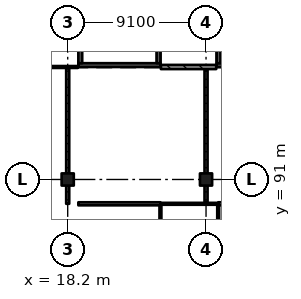
"""IFC4 building model, lengths in metres.
Left out: names, types, materials, properties, quantities, classifications, styles, units other than length and angle.
Written with IfcOpenShell. Run it as: python <this file> out.ifc"""

import sys

from ifc_helpers import new_model, si_unit, direction, frame, frame_2d, origin, origin_2d, place, context, subcontext, project, spatial, rectangle, extrude, element, fill, save


model = new_model("IFC4")
c1 = context("Model", 3, precision=1e-05, world=origin(), true_north=direction((0.0, 1.0)))
c2 = subcontext(c1, "Body", "Model", "MODEL_VIEW")
j1 = project(units=[si_unit("LENGTHUNIT", "METRE"), si_unit("PLANEANGLEUNIT", "RADIAN")], contexts=[c1])
p1 = place(None, origin())
s1 = spatial("IfcSite", under=j1, at=p1, CompositionType="ELEMENT")
p2 = place(p1, origin())
s2 = spatial("IfcBuilding", under=s1, at=p2, CompositionType="ELEMENT")
p3 = place(p2, frame((0.0, 0.0, 10.92)))
s3 = spatial("IfcBuildingStorey", under=s2, at=p3, CompositionType="ELEMENT", Elevation=10.92)
for number, where, z_axis, x_axis in (
    (1, (18.2, 91.0, 0.0), (0.0, 0.0, 1.0), (1.0, 0.0, 0.0)),
    (2, (27.3, 91.0, 0.0), (0.0, 0.0, 1.0), (1.0, 0.0, 0.0)),
):
    element("IfcColumn", number, at=place(p3, frame(where, z_axis=z_axis, x_axis=x_axis)), inside=s3, PredefinedType="COLUMN", context=c2, shape_type="SweptSolid", body=[
        extrude(rectangle(XDim=0.8, YDim=0.8, at=origin_2d()), origin(), (0.0, 0.0, 1.0), 4.55),
    ])
p4 = place(p3, frame((24.3, 98.525, 0.0), z_axis=(0.0, 0.0, 1.0), x_axis=(-1.0, 0.0, 0.0)))
e3 = element("IfcWall", 3, at=p4, inside=s3, PredefinedType="SHEAR", context=c2, shape_type="SweptSolid", body=[
    extrude(rectangle(XDim=5.4, YDim=0.25, at=frame_2d((2.7, 0.0))), origin(), (0.0, 0.0, 1.0), 4.55),
])
p5 = place(p4, frame((1.5, 0.0, 0.0)))
e4 = element("IfcOpeningElement", 4, at=p5, cuts=e3, PredefinedType="OPENING", context=c2, shape_type="SweptSolid", body=[
    extrude(rectangle(XDim=2.4, YDim=2.1, at=frame_2d((1.2, 1.05))), frame((0.0, 0.135, 0.0), z_axis=(0.0, -1.0, 0.0), x_axis=(1.0, 0.0, 0.0)), (0.0, 0.0, 1.0), 0.27),
])
for number, where, z_axis, x_axis in (
    (5, (19.025, 108.25, 0.0), (0.0, 0.0, 1.0), (0.0, -1.0, 0.0)),
    (6, (24.175, 108.25, 0.0), (0.0, 0.0, 1.0), (0.0, -1.0, 0.0)),
):
    element("IfcWall", number, at=place(p3, frame(where, z_axis=z_axis, x_axis=x_axis)), inside=s3, PredefinedType="SHEAR", context=c2, shape_type="SweptSolid", body=[
        extrude(rectangle(XDim=9.6, YDim=0.25, at=frame_2d((4.8, 0.0))), origin(), (0.0, 0.0, 1.0), 4.55),
    ])
p6 = place(p3, frame((33.4, 98.525, 0.0), z_axis=(0.0, 0.0, 1.0), x_axis=(-1.0, 0.0, 0.0)))
e7 = element("IfcWall", 7, at=p6, inside=s3, PredefinedType="SHEAR", context=c2, shape_type="SweptSolid", body=[
    extrude(rectangle(XDim=5.4, YDim=0.25, at=frame_2d((2.7, 0.0))), origin(), (0.0, 0.0, 1.0), 4.55),
])
p7 = place(p6, frame((1.5, 0.0, 0.0)))
e8 = element("IfcOpeningElement", 8, at=p7, cuts=e7, PredefinedType="OPENING", context=c2, shape_type="SweptSolid", body=[
    extrude(rectangle(XDim=2.4, YDim=2.1, at=frame_2d((1.2, 1.05))), frame((0.0, 0.135, 0.0), z_axis=(0.0, -1.0, 0.0), x_axis=(1.0, 0.0, 0.0)), (0.0, 0.0, 1.0), 0.27),
])
p8 = place(p3, frame((28.125, 108.25, 0.0), z_axis=(0.0, 0.0, 1.0), x_axis=(0.0, -1.0, 0.0)))
e9 = element("IfcWall", 9, at=p8, inside=s3, PredefinedType="SHEAR", context=c2, shape_type="SweptSolid", body=[
    extrude(rectangle(XDim=9.6, YDim=0.25, at=frame_2d((4.8, 0.0))), origin(), (0.0, 0.0, 1.0), 4.55),
])
p9 = place(p3, frame((15.23, 98.4, 0.0), z_axis=(0.0, 0.0, 1.0), x_axis=(1.0, 0.0, 0.0)))
e10 = element("IfcWall", 10, at=p9, inside=s3, PredefinedType="PARTITIONING", context=c2, shape_type="SweptSolid", body=[
    extrude(rectangle(XDim=3.64, YDim=0.125, at=frame_2d((1.82, 0.0))), origin(), (0.0, 0.0, 1.0), 4.25),
])
p10 = place(p9, frame((1.05, 0.0, 0.0)))
e11 = element("IfcOpeningElement", 11, at=p10, cuts=e10, PredefinedType="OPENING", context=c2, shape_type="SweptSolid", body=[
    extrude(rectangle(XDim=0.9, YDim=2.1, at=frame_2d((0.45, 1.05))), frame((0.0, 0.073, 0.0), z_axis=(0.0, -1.0, 0.0), x_axis=(1.0, 0.0, 0.0)), (0.0, 0.0, 1.0), 0.145),
])
p11 = place(p3, frame((18.2, 90.6, 0.0), z_axis=(0.0, 0.0, 1.0), x_axis=(0.0, -1.0, 0.0)))
e12 = element("IfcWall", 12, at=p11, inside=s3, PredefinedType="PARTITIONING", context=c2, shape_type="SweptSolid", body=[
    extrude(rectangle(XDim=1.2, YDim=0.2, at=frame_2d((0.6, 0.0))), origin(), (0.0, 0.0, 1.0), 3.55),
])
p12 = place(p3, frame((18.2, 98.337, 0.0), z_axis=(0.0, 0.0, 1.0), x_axis=(0.0, -1.0, 0.0)))
e13 = element("IfcWall", 13, at=p12, inside=s3, PredefinedType="PARTITIONING", context=c2, shape_type="SweptSolid", body=[
    extrude(rectangle(XDim=6.938, YDim=0.2, at=frame_2d((3.469, 0.0))), origin(), (0.0, 0.0, 1.0), 3.55),
])
p13 = place(p12, frame((0.85, 0.0, 0.0)))
e14 = element("IfcOpeningElement", 14, at=p13, cuts=e13, PredefinedType="OPENING", context=c2, shape_type="SweptSolid", body=[
    extrude(rectangle(XDim=1.8, YDim=2.4, at=frame_2d((0.9, 1.2))), frame((0.0, 0.11, 0.0), z_axis=(0.0, -1.0, 0.0), x_axis=(1.0, 0.0, 0.0)), (0.0, 0.0, 1.0), 0.22),
])
p14 = place(p12, frame((4.35, 0.0, 0.0)))
e15 = element("IfcOpeningElement", 15, at=p14, cuts=e13, PredefinedType="OPENING", context=c2, shape_type="SweptSolid", body=[
    extrude(rectangle(XDim=1.8, YDim=2.4, at=frame_2d((0.9, 1.2))), frame((0.0, 0.11, 0.0), z_axis=(0.0, -1.0, 0.0), x_axis=(1.0, 0.0, 0.0)), (0.0, 0.0, 1.0), 0.22),
])
p15 = place(p3, frame((24.3, 86.462, 0.0), z_axis=(0.0, 0.0, 1.0), x_axis=(0.0, 1.0, 0.0)))
e16 = element("IfcWall", 16, at=p15, inside=s3, PredefinedType="PARTITIONING", context=c2, shape_type="SweptSolid", body=[
    extrude(rectangle(XDim=2.838, YDim=0.125, at=frame_2d((1.419, 0.0))), origin(), (0.0, 0.0, 1.0), 4.25),
])
p16 = place(p3, frame((24.3, 89.4, 0.0), z_axis=(0.0, 0.0, 1.0), x_axis=(-1.0, 0.0, 0.0)))
e17 = element("IfcWall", 17, at=p16, inside=s3, PredefinedType="PARTITIONING", context=c2, shape_type="SweptSolid", body=[
    extrude(rectangle(XDim=5.4, YDim=0.2, at=frame_2d((2.7, 0.0))), origin(), (0.0, 0.0, 1.0), 4.25),
])
p17 = place(p16, frame((1.85, 0.0, 0.0)))
e18 = element("IfcOpeningElement", 18, at=p17, cuts=e17, PredefinedType="OPENING", context=c2, shape_type="SweptSolid", body=[
    extrude(rectangle(XDim=1.8, YDim=2.4, at=frame_2d((0.9, 1.2))), frame((0.0, 0.11, 0.0), z_axis=(0.0, -1.0, 0.0), x_axis=(1.0, 0.0, 0.0)), (0.0, 0.0, 1.0), 0.22),
])
p18 = place(p3, frame((24.33, 98.4, 0.0), z_axis=(0.0, 0.0, 1.0), x_axis=(1.0, 0.0, 0.0)))
e19 = element("IfcWall", 19, at=p18, inside=s3, PredefinedType="SOLIDWALL", context=c2, shape_type="SweptSolid", body=[
    extrude(rectangle(XDim=3.64, YDim=0.275, at=frame_2d((1.82, 0.0))), origin(), (0.0, 0.0, 1.0), 4.25),
])
p19 = place(p18, frame((0.85, 0.0, 0.0)))
e20 = element("IfcOpeningElement", 20, at=p19, cuts=e19, PredefinedType="OPENING", context=c2, shape_type="SweptSolid", body=[
    extrude(rectangle(XDim=1.2, YDim=2.4, at=frame_2d((0.6, 1.2))), frame((0.0, 0.147, 0.0), z_axis=(0.0, -1.0, 0.0), x_axis=(1.0, 0.0, 0.0)), (0.0, 0.0, 1.0), 0.295),
])
p20 = place(p3, frame((24.3, 89.4, 0.0), z_axis=(0.0, 0.0, 1.0), x_axis=(1.0, 0.0, 0.0)))
e21 = element("IfcWall", 21, at=p20, inside=s3, PredefinedType="PARTITIONING", context=c2, shape_type="SweptSolid", body=[
    extrude(rectangle(XDim=3.8, YDim=0.125, at=frame_2d((1.9, 0.0))), origin(), (0.0, 0.0, 1.0), 4.25),
])
p21 = place(p20, frame((1.05, 0.0, 0.0)))
e22 = element("IfcOpeningElement", 22, at=p21, cuts=e21, PredefinedType="OPENING", context=c2, shape_type="SweptSolid", body=[
    extrude(rectangle(XDim=0.9, YDim=2.1, at=frame_2d((0.45, 1.05))), frame((0.0, 0.073, 0.0), z_axis=(0.0, -1.0, 0.0), x_axis=(1.0, 0.0, 0.0)), (0.0, 0.0, 1.0), 0.145),
])
p22 = place(p3, frame((27.3, 90.6, 0.0), z_axis=(0.0, 0.0, 1.0), x_axis=(0.0, -1.0, 0.0)))
e23 = element("IfcWall", 23, at=p22, inside=s3, PredefinedType="PARTITIONING", context=c2, shape_type="SweptSolid", body=[
    extrude(rectangle(XDim=1.138, YDim=0.2, at=frame_2d((0.569, 0.0))), origin(), (0.0, 0.0, 1.0), 3.55),
])
p23 = place(p3, frame((27.3, 98.262, 0.0), z_axis=(0.0, 0.0, 1.0), x_axis=(0.0, -1.0, 0.0)))
e24 = element("IfcWall", 24, at=p23, inside=s3, PredefinedType="PARTITIONING", context=c2, shape_type="SweptSolid", body=[
    extrude(rectangle(XDim=6.863, YDim=0.2, at=frame_2d((3.431, 0.0))), origin(), (0.0, 0.0, 1.0), 3.55),
])
p24 = place(p23, frame((0.85, 0.0, 0.0)))
e25 = element("IfcOpeningElement", 25, at=p24, cuts=e24, PredefinedType="OPENING", context=c2, shape_type="SweptSolid", body=[
    extrude(rectangle(XDim=1.8, YDim=2.4, at=frame_2d((0.9, 1.2))), frame((0.0, 0.11, 0.0), z_axis=(0.0, -1.0, 0.0), x_axis=(1.0, 0.0, 0.0)), (0.0, 0.0, 1.0), 0.22),
])
p25 = place(p23, frame((4.25, 0.0, 0.0)))
e26 = element("IfcOpeningElement", 26, at=p25, cuts=e24, PredefinedType="OPENING", context=c2, shape_type="SweptSolid", body=[
    extrude(rectangle(XDim=1.8, YDim=2.4, at=frame_2d((0.9, 1.2))), frame((0.0, 0.11, 0.0), z_axis=(0.0, -1.0, 0.0), x_axis=(1.0, 0.0, 0.0)), (0.0, 0.0, 1.0), 0.22),
])
p26 = place(p3, frame((28.1, 89.3, 0.0), z_axis=(0.0, 0.0, 1.0), x_axis=(0.0, -1.0, 0.0)))
e27 = element("IfcWall", 27, at=p26, inside=s3, PredefinedType="PARTITIONING", context=c2, shape_type="SweptSolid", body=[
    extrude(rectangle(XDim=2.87, YDim=0.125, at=frame_2d((1.435, 0.0))), origin(), (0.0, 0.0, 1.0), 4.25),
])
p27 = place(p3, frame((33.4, 89.4, 0.0), z_axis=(0.0, 0.0, 1.0), x_axis=(-1.0, 0.0, 0.0)))
e28 = element("IfcWall", 28, at=p27, inside=s3, PredefinedType="PARTITIONING", context=c2, shape_type="SweptSolid", body=[
    extrude(rectangle(XDim=5.3, YDim=0.2, at=frame_2d((2.65, 0.0))), origin(), (0.0, 0.0, 1.0), 4.25),
])
p28 = place(p27, frame((1.75, 0.0, 0.0)))
e29 = element("IfcOpeningElement", 29, at=p28, cuts=e28, PredefinedType="OPENING", context=c2, shape_type="SweptSolid", body=[
    extrude(rectangle(XDim=1.8, YDim=2.4, at=frame_2d((0.9, 1.2))), frame((0.0, 0.11, 0.0), z_axis=(0.0, -1.0, 0.0), x_axis=(1.0, 0.0, 0.0)), (0.0, 0.0, 1.0), 0.22),
])
p29 = place(p21, origin())
e30 = element("IfcDoor", 30, at=p29, inside=s3, OperationType="SINGLE_SWING_LEFT", PredefinedType="DOOR", context=c2, shape_type="SweptSolid", body=[
    extrude(rectangle(XDim=0.9, YDim=2.1, at=frame_2d((0.45, 1.05))), frame((0.0, 0.025, 0.0), z_axis=(0.0, -1.0, 0.0), x_axis=(1.0, 0.0, 0.0)), (0.0, 0.0, 1.0), 0.05),
])
fill(e22, e30)
p30 = place(p19, origin())
e31 = element("IfcDoor", 31, at=p30, inside=s3, OperationType="SINGLE_SWING_RIGHT", PredefinedType="DOOR", context=c2, shape_type="SweptSolid", body=[
    extrude(rectangle(XDim=1.2, YDim=2.4, at=frame_2d((0.6, 1.2))), frame((0.0, 0.025, 0.0), z_axis=(0.0, -1.0, 0.0), x_axis=(1.0, 0.0, 0.0)), (0.0, 0.0, 1.0), 0.05),
])
fill(e20, e31)
p31 = place(p13, origin())
e32 = element("IfcDoor", 32, at=p31, inside=s3, OperationType="DOUBLE_DOOR_SINGLE_SWING", PredefinedType="DOOR", context=c2, shape_type="SweptSolid", body=[
    extrude(rectangle(XDim=1.8, YDim=2.4, at=frame_2d((0.9, 1.2))), frame((0.0, 0.025, 0.0), z_axis=(0.0, -1.0, 0.0), x_axis=(1.0, 0.0, 0.0)), (0.0, 0.0, 1.0), 0.05),
])
fill(e14, e32)
p32 = place(p14, origin())
e33 = element("IfcDoor", 33, at=p32, inside=s3, OperationType="DOUBLE_DOOR_SINGLE_SWING", PredefinedType="DOOR", context=c2, shape_type="SweptSolid", body=[
    extrude(rectangle(XDim=1.8, YDim=2.4, at=frame_2d((0.9, 1.2))), frame((0.0, 0.025, 0.0), z_axis=(0.0, -1.0, 0.0), x_axis=(1.0, 0.0, 0.0)), (0.0, 0.0, 1.0), 0.05),
])
fill(e15, e33)
p33 = place(p24, origin())
e34 = element("IfcDoor", 34, at=p33, inside=s3, OperationType="DOUBLE_DOOR_SINGLE_SWING", PredefinedType="DOOR", context=c2, shape_type="SweptSolid", body=[
    extrude(rectangle(XDim=1.8, YDim=2.4, at=frame_2d((0.9, 1.2))), frame((0.0, 0.025, 0.0), z_axis=(0.0, -1.0, 0.0), x_axis=(1.0, 0.0, 0.0)), (0.0, 0.0, 1.0), 0.05),
])
fill(e25, e34)
p34 = place(p25, origin())
e35 = element("IfcDoor", 35, at=p34, inside=s3, OperationType="DOUBLE_DOOR_SINGLE_SWING", PredefinedType="DOOR", context=c2, shape_type="SweptSolid", body=[
    extrude(rectangle(XDim=1.8, YDim=2.4, at=frame_2d((0.9, 1.2))), frame((0.0, 0.025, 0.0), z_axis=(0.0, -1.0, 0.0), x_axis=(1.0, 0.0, 0.0)), (0.0, 0.0, 1.0), 0.05),
])
fill(e26, e35)
p35 = place(p17, origin())
e36 = element("IfcDoor", 36, at=p35, inside=s3, OperationType="DOUBLE_DOOR_SINGLE_SWING", PredefinedType="DOOR", context=c2, shape_type="SweptSolid", body=[
    extrude(rectangle(XDim=1.8, YDim=2.4, at=frame_2d((0.9, 1.2))), frame((0.0, 0.025, 0.0), z_axis=(0.0, -1.0, 0.0), x_axis=(1.0, 0.0, 0.0)), (0.0, 0.0, 1.0), 0.05),
])
fill(e18, e36)
p36 = place(p5, origin())
e37 = element("IfcDoor", 37, at=p36, inside=s3, OperationType="DOUBLE_DOOR_SINGLE_SWING", PredefinedType="DOOR", context=c2, shape_type="SweptSolid", body=[
    extrude(rectangle(XDim=2.4, YDim=2.1, at=frame_2d((1.2, 1.05))), frame((0.0, 0.025, 0.0), z_axis=(0.0, -1.0, 0.0), x_axis=(1.0, 0.0, 0.0)), (0.0, 0.0, 1.0), 0.05),
])
fill(e4, e37)
save(model, sys.argv[1])
